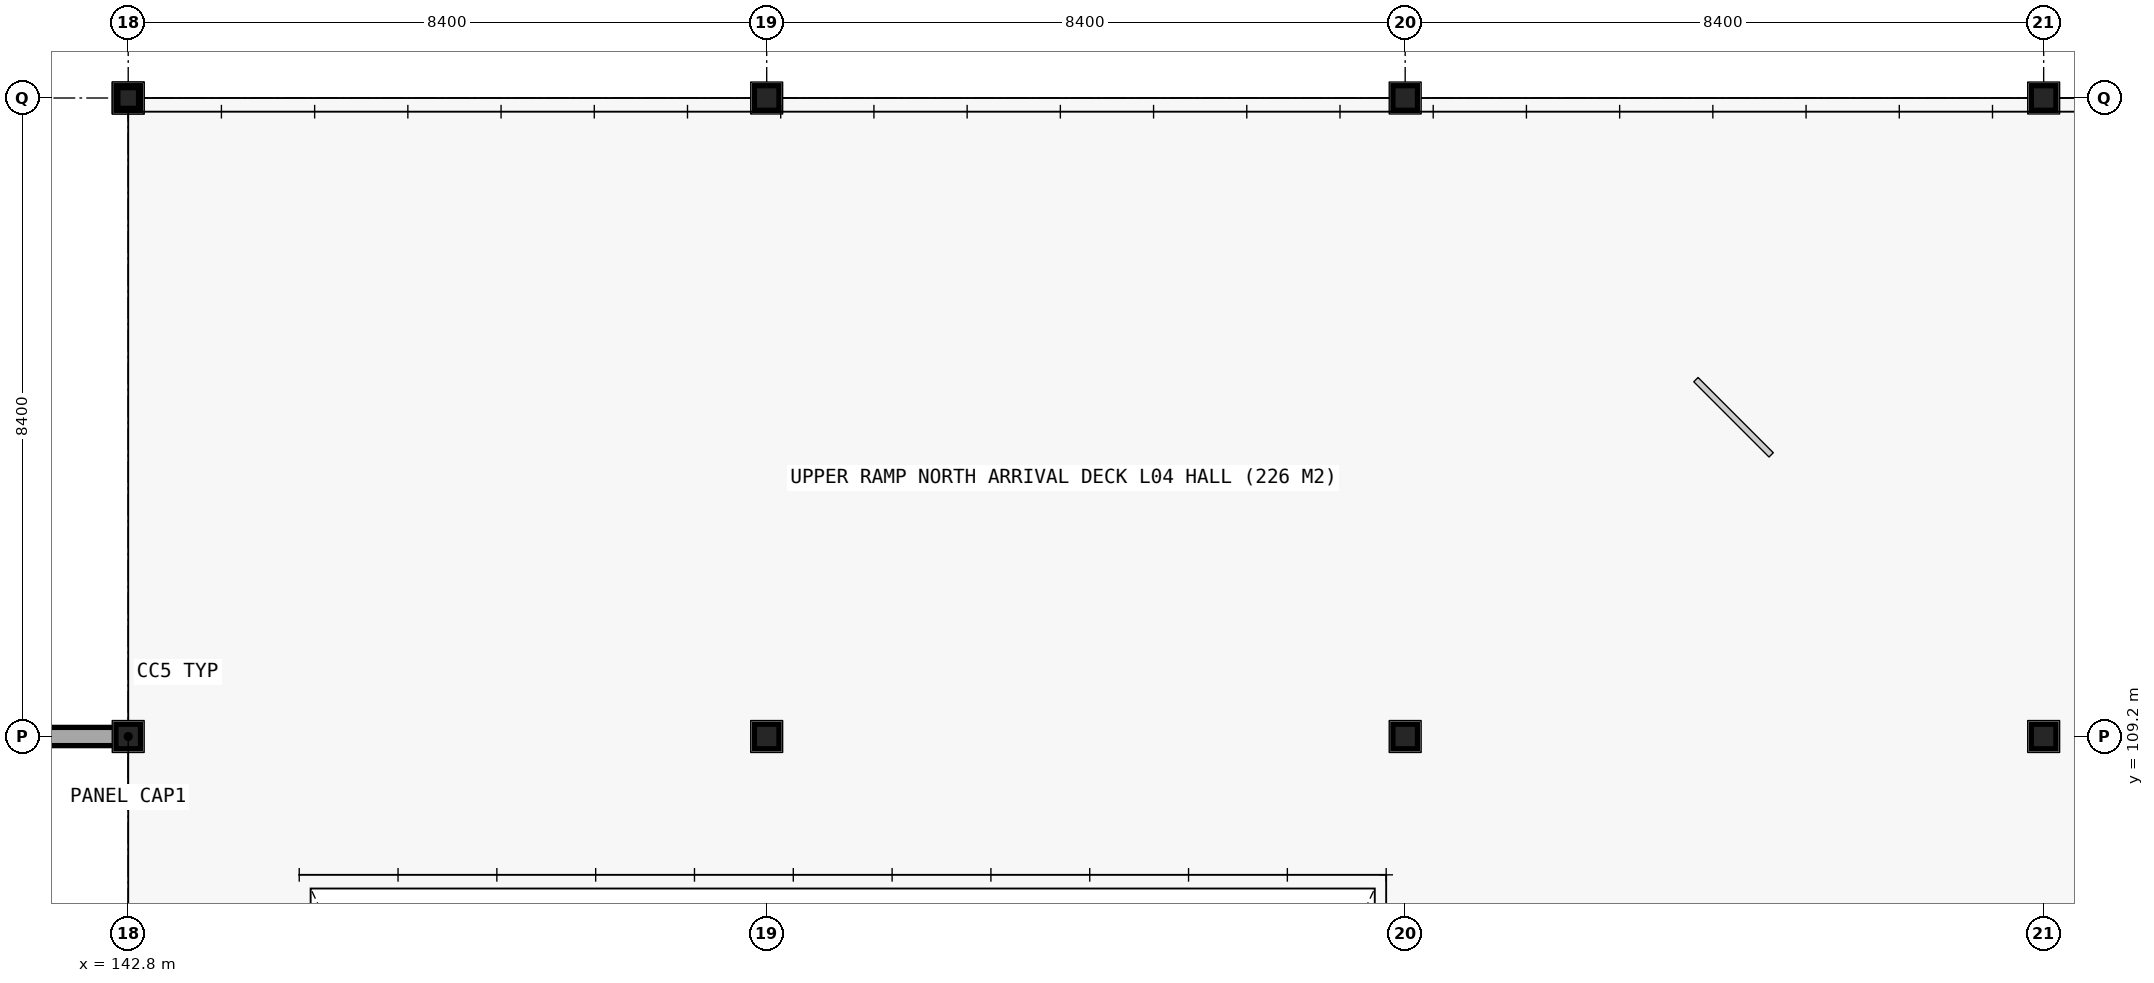
"""IFC4 building model, lengths in metres.
Left out: names, types, materials, properties, quantities, classifications, styles, units other than length and angle.
Written with IfcOpenShell. Run it as: python <this file> out.ifc"""

import sys

from ifc_helpers import new_model, si_unit, direction, frame, frame_2d, origin, origin_2d, place, context, subcontext, project, spatial, rectangle, hollow_circle, extrude, element, save


model = new_model("IFC4")
c1 = context("Model", 3, precision=1e-05, world=origin(), true_north=direction((0.0, 1.0)))
c2 = subcontext(c1, "Body", "Model", "MODEL_VIEW")
j1 = project(units=[si_unit("LENGTHUNIT", "METRE"), si_unit("PLANEANGLEUNIT", "RADIAN")], contexts=[c1])
p1 = place(None, origin())
s1 = spatial("IfcSite", under=j1, at=p1, CompositionType="ELEMENT")
p2 = place(p1, origin())
s2 = spatial("IfcBuilding", under=s1, at=p2, CompositionType="ELEMENT")
p3 = place(p2, frame((0.0, 0.0, 17.4)))
s3 = spatial("IfcBuildingStorey", under=s2, at=p3, CompositionType="ELEMENT", Elevation=17.4)
for number, where, z_axis, x_axis in (
    (1, (142.8, 109.2, 0.0), (0.0, 0.0, 1.0), (1.0, 0.0, 0.0)),
    (2, (142.8, 117.6, 0.0), (0.0, 0.0, 1.0), (1.0, 0.0, 0.0)),
    (3, (151.2, 109.2, 0.0), (0.0, 0.0, 1.0), (1.0, 0.0, 0.0)),
    (4, (151.2, 117.6, 0.0), (0.0, 0.0, 1.0), (1.0, 0.0, 0.0)),
    (5, (159.6, 109.2, 0.0), (0.0, 0.0, 1.0), (1.0, 0.0, 0.0)),
    (6, (159.6, 117.6, 0.0), (0.0, 0.0, 1.0), (1.0, 0.0, 0.0)),
    (7, (168.0, 109.2, 0.0), (0.0, 0.0, 1.0), (1.0, 0.0, 0.0)),
    (8, (168.0, 117.6, 0.0), (0.0, 0.0, 1.0), (1.0, 0.0, 0.0)),
):
    element("IfcColumn", number, at=place(p3, frame(where, z_axis=z_axis, x_axis=x_axis)), inside=s3, PredefinedType="COLUMN", context=c2, shape_type="SweptSolid", body=[
        extrude(hollow_circle(Radius=0.162, WallThickness=0.01, at=origin_2d()), origin(), (0.0, 0.0, 1.0), 4.03),
    ])
p4 = place(p3, frame((142.8, 117.6, 4.03), z_axis=(0.0, 0.0, 1.0), x_axis=(1.0, 0.0, 0.0)))
e9 = element("IfcColumn", 9, at=p4, inside=s3, PredefinedType="COLUMN", context=c2, shape_type="SweptSolid", body=[
    extrude(hollow_circle(Radius=0.136, WallThickness=0.009, at=origin_2d()), origin(), (0.0, 0.0, 1.0), 3.2),
])
p5 = place(p3, frame((100.8, 109.2, 3.9), z_axis=(0.0, 0.0, 1.0), x_axis=(1.0, 0.0, 0.0)))
e10 = element("IfcWall", 10, at=p5, inside=s3, PredefinedType="PARAPET", context=c2, shape_type="SweptSolid", body=[
    extrude(rectangle(XDim=42.0, YDim=0.24, at=frame_2d((21.0, 0.0))), origin(), (0.0, 0.0, 1.0), 0.95),
])
save(model, sys.argv[1])
